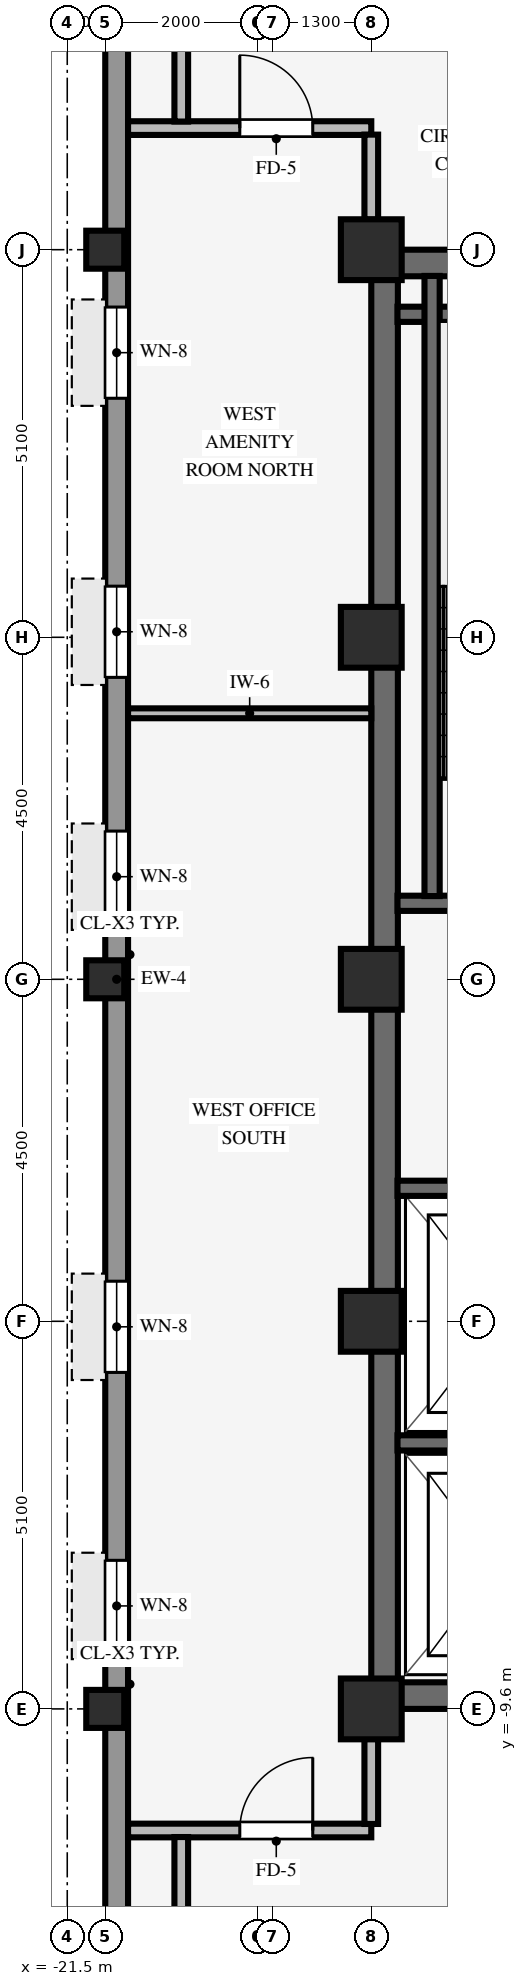
"""IFC4 building model, lengths in metres.
Left out: names, types, materials, properties, quantities, classifications, styles, units other than length and angle.
Written with IfcOpenShell. Run it as: python <this file> out.ifc"""

import sys

from ifc_helpers import new_model, si_unit, direction, frame, frame_2d, origin, origin_2d, place, context, subcontext, project, spatial, rectangle, hollow_rectangle, extrude, source, transform, mapped, element, fill, save


model = new_model("IFC4")
c1 = context("Model", 3, precision=1e-05, world=origin(), true_north=direction((0.0, 1.0)))
c2 = subcontext(c1, "Body", "Model", "MODEL_VIEW")
j1 = project(units=[si_unit("LENGTHUNIT", "METRE"), si_unit("PLANEANGLEUNIT", "RADIAN")], contexts=[c1])
p1 = place(None, origin())
s1 = spatial("IfcSite", under=j1, at=p1, CompositionType="ELEMENT")
p2 = place(p1, origin())
s2 = spatial("IfcBuilding", under=s1, at=p2, CompositionType="ELEMENT")
p3 = place(p2, frame((0.0, 0.0, 257.95)))
s3 = spatial("IfcBuildingStorey", under=s2, at=p3, CompositionType="ELEMENT", Elevation=257.95)
for number, where, z_axis, x_axis in (
    (1, (-17.5, -9.425, 0.0), (0.0, 0.0, 1.0), (1.0, 0.0, 0.0)),
    (2, (-17.5, 9.425, 0.0), (0.0, 0.0, 1.0), (1.0, 0.0, 0.0)),
):
    element("IfcWall", number, at=place(p3, frame(where, z_axis=z_axis, x_axis=x_axis)), inside=s3, PredefinedType="SHEAR", context=c2, shape_type="SweptSolid", body=[
        extrude(rectangle(XDim=8.5, YDim=0.35, at=frame_2d((4.25, 0.0))), origin(), (0.0, 0.0, 1.0), 3.37),
    ])
p4 = place(p3, frame((-17.325, -9.255, 0.0), z_axis=(0.0, 0.0, 1.0), x_axis=(0.0, 1.0, 0.0)))
e3 = element("IfcWall", 3, at=p4, inside=s3, PredefinedType="SHEAR", context=c2, shape_type="SweptSolid", body=[
    extrude(rectangle(XDim=18.51, YDim=0.35, at=frame_2d((9.255, 0.0))), origin(), (0.0, 0.0, 1.0), 3.37),
])
for number, where, z_axis, x_axis in (
    (4, (-17.5, -9.6, 0.0), (0.0, 0.0, 1.0), (1.0, 0.0, 0.0)),
    (5, (-17.5, -4.5, 0.0), (0.0, 0.0, 1.0), (1.0, 0.0, 0.0)),
    (6, (-17.5, 4.5, 0.0), (0.0, 0.0, 1.0), (1.0, 0.0, 0.0)),
    (7, (-17.5, 9.6, 0.0), (0.0, 0.0, 1.0), (1.0, 0.0, 0.0)),
    (8, (-17.5, 0.0, 0.0), (0.0, 0.0, 1.0), (1.0, 0.0, 0.0)),
):
    element("IfcColumn", number, at=place(p3, frame(where, z_axis=z_axis, x_axis=x_axis)), inside=s3, PredefinedType="COLUMN", context=c2, shape_type="SweptSolid", body=[
        extrude(rectangle(XDim=0.8, YDim=0.8, at=origin_2d()), origin(), (0.0, 0.0, 1.0), 3.37),
    ])
for number, where, z_axis, x_axis in (
    (9, (-21.0, -9.6, 0.0), (0.0, 0.0, 1.0), (1.0, 0.0, 0.0)),
    (10, (-21.0, 0.0, 0.0), (0.0, 0.0, 1.0), (1.0, 0.0, 0.0)),
    (11, (-21.0, 9.6, 0.0), (0.0, 0.0, 1.0), (1.0, 0.0, 0.0)),
):
    element("IfcColumn", number, at=place(p3, frame(where, z_axis=z_axis, x_axis=x_axis)), inside=s3, PredefinedType="COLUMN", context=c2, shape_type="SweptSolid", body=[
        extrude(hollow_rectangle(XDim=0.5, YDim=0.5, WallThickness=0.032, InnerFilletRadius=0.032, OuterFilletRadius=0.064, at=origin_2d()), origin(), (0.0, 0.0, 1.0), 3.37),
    ])
p5 = place(p3, frame((-20.85, -17.004, 0.0), z_axis=(0.0, 0.0, 1.0), x_axis=(0.0, 1.0, 0.0)))
e12 = element("IfcWall", 12, at=p5, inside=s3, PredefinedType="STANDARD", context=c2, shape_type="SweptSolid", body=[
    extrude(rectangle(XDim=34.008, YDim=0.3, at=frame_2d((17.004, 0.0))), origin(), (0.0, 0.0, 1.0), 2.705),
])
p6 = place(p5, frame((1.786, 0.0, 0.8)))
e13 = element("IfcOpeningElement", 13, at=p6, cuts=e12, PredefinedType="OPENING", context=c2, shape_type="SweptSolid", body=[
    extrude(rectangle(XDim=1.2, YDim=1.48, at=frame_2d((0.6, 0.74))), frame((0.0, 0.16, 0.0), z_axis=(0.0, -1.0, 0.0), x_axis=(1.0, 0.0, 0.0)), (0.0, 0.0, 1.0), 0.32),
])
p7 = place(p5, frame((8.159, 0.0, 0.8)))
e14 = element("IfcOpeningElement", 14, at=p7, cuts=e12, PredefinedType="OPENING", context=c2, shape_type="SweptSolid", body=[
    extrude(rectangle(XDim=1.2, YDim=1.48, at=frame_2d((0.6, 0.74))), frame((0.0, 0.16, 0.0), z_axis=(0.0, -1.0, 0.0), x_axis=(1.0, 0.0, 0.0)), (0.0, 0.0, 1.0), 0.32),
])
p8 = place(p5, frame((11.831, 0.0, 0.8)))
e15 = element("IfcOpeningElement", 15, at=p8, cuts=e12, PredefinedType="OPENING", context=c2, shape_type="SweptSolid", body=[
    extrude(rectangle(XDim=1.2, YDim=1.48, at=frame_2d((0.6, 0.74))), frame((0.0, 0.16, 0.0), z_axis=(0.0, -1.0, 0.0), x_axis=(1.0, 0.0, 0.0)), (0.0, 0.0, 1.0), 0.32),
])
p9 = place(p5, frame((17.754, 0.0, 0.8)))
e16 = element("IfcOpeningElement", 16, at=p9, cuts=e12, PredefinedType="OPENING", context=c2, shape_type="SweptSolid", body=[
    extrude(rectangle(XDim=1.2, YDim=1.48, at=frame_2d((0.6, 0.74))), frame((0.0, 0.16, 0.0), z_axis=(0.0, -1.0, 0.0), x_axis=(1.0, 0.0, 0.0)), (0.0, 0.0, 1.0), 0.32),
])
p10 = place(p5, frame((20.977, 0.0, 0.8)))
e17 = element("IfcOpeningElement", 17, at=p10, cuts=e12, PredefinedType="OPENING", context=c2, shape_type="SweptSolid", body=[
    extrude(rectangle(XDim=1.2, YDim=1.48, at=frame_2d((0.6, 0.74))), frame((0.0, 0.16, 0.0), z_axis=(0.0, -1.0, 0.0), x_axis=(1.0, 0.0, 0.0)), (0.0, 0.0, 1.0), 0.32),
])
p11 = place(p5, frame((24.649, 0.0, 0.8)))
e18 = element("IfcOpeningElement", 18, at=p11, cuts=e12, PredefinedType="OPENING", context=c2, shape_type="SweptSolid", body=[
    extrude(rectangle(XDim=1.2, YDim=1.48, at=frame_2d((0.6, 0.74))), frame((0.0, 0.16, 0.0), z_axis=(0.0, -1.0, 0.0), x_axis=(1.0, 0.0, 0.0)), (0.0, 0.0, 1.0), 0.32),
])
p12 = place(p5, frame((31.022, 0.0, 0.8)))
e19 = element("IfcOpeningElement", 19, at=p12, cuts=e12, PredefinedType="OPENING", context=c2, shape_type="SweptSolid", body=[
    extrude(rectangle(XDim=1.2, YDim=1.48, at=frame_2d((0.6, 0.74))), frame((0.0, 0.16, 0.0), z_axis=(0.0, -1.0, 0.0), x_axis=(1.0, 0.0, 0.0)), (0.0, 0.0, 1.0), 0.32),
])
for number, where, z_axis, x_axis in (
    (20, (-17.155, 1.0, 0.0), (0.0, 0.0, 1.0), (1.0, 0.0, 0.0)),
    (21, (-17.155, 8.75, 0.0), (0.0, 0.0, 1.0), (1.0, 0.0, 0.0)),
):
    element("IfcWall", number, at=place(p3, frame(where, z_axis=z_axis, x_axis=x_axis)), inside=s3, PredefinedType="SHEAR", context=c2, shape_type="SweptSolid", body=[
        extrude(rectangle(XDim=3.62, YDim=0.2, at=frame_2d((1.81, 0.0))), origin(), (0.0, 0.0, 1.0), 3.37),
    ])
p13 = place(p3, frame((-16.7, 1.095, 0.0), z_axis=(0.0, 0.0, 1.0), x_axis=(0.0, 1.0, 0.0)))
e22 = element("IfcWall", 22, at=p13, inside=s3, PredefinedType="SHEAR", context=c2, shape_type="SweptSolid", body=[
    extrude(rectangle(XDim=8.16, YDim=0.2, at=frame_2d((4.08, 0.0))), origin(), (0.0, 0.0, 1.0), 3.37),
])
p14 = place(p3, frame((-17.155, -6.1, 0.0), z_axis=(0.0, 0.0, 1.0), x_axis=(1.0, 0.0, 0.0)))
e23 = element("IfcWall", 23, at=p14, inside=s3, PredefinedType="SHEAR", context=c2, shape_type="SweptSolid", body=[
    extrude(rectangle(XDim=2.905, YDim=0.2, at=frame_2d((1.453, 0.0))), origin(), (0.0, 0.0, 1.0), 3.37),
])
p15 = place(p3, frame((-17.155, -2.75, 0.0), z_axis=(0.0, 0.0, 1.0), x_axis=(1.0, 0.0, 0.0)))
e24 = element("IfcWall", 24, at=p15, inside=s3, PredefinedType="SHEAR", context=c2, shape_type="SweptSolid", body=[
    extrude(rectangle(XDim=2.71, YDim=0.2, at=frame_2d((1.355, 0.0))), origin(), (0.0, 0.0, 1.0), 3.37),
])
p16 = place(p3, frame((-20.7, -11.2, 0.0), z_axis=(0.0, 0.0, 1.0), x_axis=(1.0, 0.0, 0.0)))
e25 = element("IfcWall", 25, at=p16, inside=s3, PredefinedType="PARTITIONING", context=c2, shape_type="SweptSolid", body=[
    extrude(rectangle(XDim=3.2, YDim=0.18, at=frame_2d((1.6, 0.0))), origin(), (0.0, 0.0, 1.0), 3.36),
])
p17 = place(p16, frame((1.47, 0.0, 0.0)))
e26 = element("IfcOpeningElement", 26, at=p17, cuts=e25, PredefinedType="OPENING", context=c2, shape_type="SweptSolid", body=[
    extrude(rectangle(XDim=0.96, YDim=2.1, at=frame_2d((0.48, 1.05))), frame((0.0, 0.1, 0.0), z_axis=(0.0, -1.0, 0.0), x_axis=(1.0, 0.0, 0.0)), (0.0, 0.0, 1.0), 0.2),
])
p18 = place(p3, frame((-20.7, 3.5, 0.0), z_axis=(0.0, 0.0, 1.0), x_axis=(1.0, 0.0, 0.0)))
e27 = element("IfcWall", 27, at=p18, inside=s3, PredefinedType="PARTITIONING", context=c2, shape_type="SweptSolid", body=[
    extrude(rectangle(XDim=3.2, YDim=0.13, at=frame_2d((1.6, 0.0))), origin(), (0.0, 0.0, 1.0), 3.36),
])
p19 = place(p3, frame((-20.7, 11.2, 0.0), z_axis=(0.0, 0.0, 1.0), x_axis=(1.0, 0.0, 0.0)))
e28 = element("IfcWall", 28, at=p19, inside=s3, PredefinedType="PARTITIONING", context=c2, shape_type="SweptSolid", body=[
    extrude(rectangle(XDim=3.2, YDim=0.18, at=frame_2d((1.6, 0.0))), origin(), (0.0, 0.0, 1.0), 3.36),
])
p20 = place(p19, frame((1.47, 0.0, 0.0)))
e29 = element("IfcOpeningElement", 29, at=p20, cuts=e28, PredefinedType="OPENING", context=c2, shape_type="SweptSolid", body=[
    extrude(rectangle(XDim=0.96, YDim=2.1, at=frame_2d((0.48, 1.05))), frame((0.0, 0.1, 0.0), z_axis=(0.0, -1.0, 0.0), x_axis=(1.0, 0.0, 0.0)), (0.0, 0.0, 1.0), 0.2),
])
for number, where, z_axis, x_axis in (
    (30, (-20.0, -13.514, 0.0), (0.0, 0.0, 1.0), (0.0, 1.0, 0.0)),
    (31, (-20.0, 11.286, 0.0), (0.0, 0.0, 1.0), (0.0, 1.0, 0.0)),
):
    element("IfcWall", number, at=place(p3, frame(where, z_axis=z_axis, x_axis=x_axis)), inside=s3, PredefinedType="PARTITIONING", context=c2, shape_type="SweptSolid", body=[
        extrude(rectangle(XDim=2.228, YDim=0.18, at=frame_2d((1.114, 0.0))), origin(), (0.0, 0.0, 1.0), 3.36),
    ])
for number, where, z_axis, x_axis in (
    (32, (-17.5, -11.114, 0.0), (0.0, 0.0, 1.0), (0.0, 1.0, 0.0)),
    (33, (-17.5, 9.996, 0.0), (0.0, 0.0, 1.0), (0.0, 1.0, 0.0)),
):
    element("IfcWall", number, at=place(p3, frame(where, z_axis=z_axis, x_axis=x_axis)), inside=s3, PredefinedType="PARTITIONING", context=c2, shape_type="SweptSolid", body=[
        extrude(rectangle(XDim=1.118, YDim=0.18, at=frame_2d((0.559, 0.0))), origin(), (0.0, 0.0, 1.0), 2.892),
    ])
m1 = source(origin(), c2, "Body", "SweptSolid", [
    extrude(rectangle(XDim=1.2, YDim=1.48, at=frame_2d((0.6, 0.74))), frame((0.0, 0.03, 0.0), z_axis=(0.0, -1.0, 0.0), x_axis=(1.0, 0.0, 0.0)), (0.0, 0.0, 1.0), 0.06),
])
p21 = place(p7, origin())
e34 = element("IfcWindow", 34, at=p21, inside=s3, PartitioningType="SINGLE_PANEL", PredefinedType="WINDOW", context=c2, shape_type="MappedRepresentation", body=[
    mapped(m1, transform((0.0, 0.0, 0.0), scale=1.0)),
])
fill(e14, e34)
p22 = place(p8, origin())
e35 = element("IfcWindow", 35, at=p22, inside=s3, PartitioningType="SINGLE_PANEL", PredefinedType="WINDOW", context=c2, shape_type="MappedRepresentation", body=[
    mapped(m1, transform((0.0, 0.0, 0.0), scale=1.0)),
])
fill(e15, e35)
p23 = place(p9, origin())
e36 = element("IfcWindow", 36, at=p23, inside=s3, PartitioningType="SINGLE_PANEL", PredefinedType="WINDOW", context=c2, shape_type="MappedRepresentation", body=[
    mapped(m1, transform((0.0, 0.0, 0.0), scale=1.0)),
])
fill(e16, e36)
p24 = place(p10, origin())
e37 = element("IfcWindow", 37, at=p24, inside=s3, PartitioningType="SINGLE_PANEL", PredefinedType="WINDOW", context=c2, shape_type="MappedRepresentation", body=[
    mapped(m1, transform((0.0, 0.0, 0.0), scale=1.0)),
])
fill(e17, e37)
p25 = place(p11, origin())
e38 = element("IfcWindow", 38, at=p25, inside=s3, PartitioningType="SINGLE_PANEL", PredefinedType="WINDOW", context=c2, shape_type="MappedRepresentation", body=[
    mapped(m1, transform((0.0, 0.0, 0.0), scale=1.0)),
])
fill(e18, e38)
m2 = source(origin(), c2, "Body", "SweptSolid", [
    extrude(rectangle(XDim=0.96, YDim=2.1, at=frame_2d((0.48, 1.05))), frame((0.0, 0.025, 0.0), z_axis=(0.0, -1.0, 0.0), x_axis=(1.0, 0.0, 0.0)), (0.0, 0.0, 1.0), 0.05),
])
p26 = place(p17, origin())
e39 = element("IfcDoor", 39, at=p26, inside=s3, OperationType="SINGLE_SWING_RIGHT", PredefinedType="DOOR", context=c2, shape_type="MappedRepresentation", body=[
    mapped(m2, transform((0.0, 0.0, 0.0), scale=1.0)),
])
fill(e26, e39)
p27 = place(p20, origin())
e40 = element("IfcDoor", 40, at=p27, inside=s3, OperationType="SINGLE_SWING_LEFT", PredefinedType="DOOR", context=c2, shape_type="MappedRepresentation", body=[
    mapped(m2, transform((0.0, 0.0, 0.0), scale=1.0)),
])
fill(e29, e40)
save(model, sys.argv[1])
